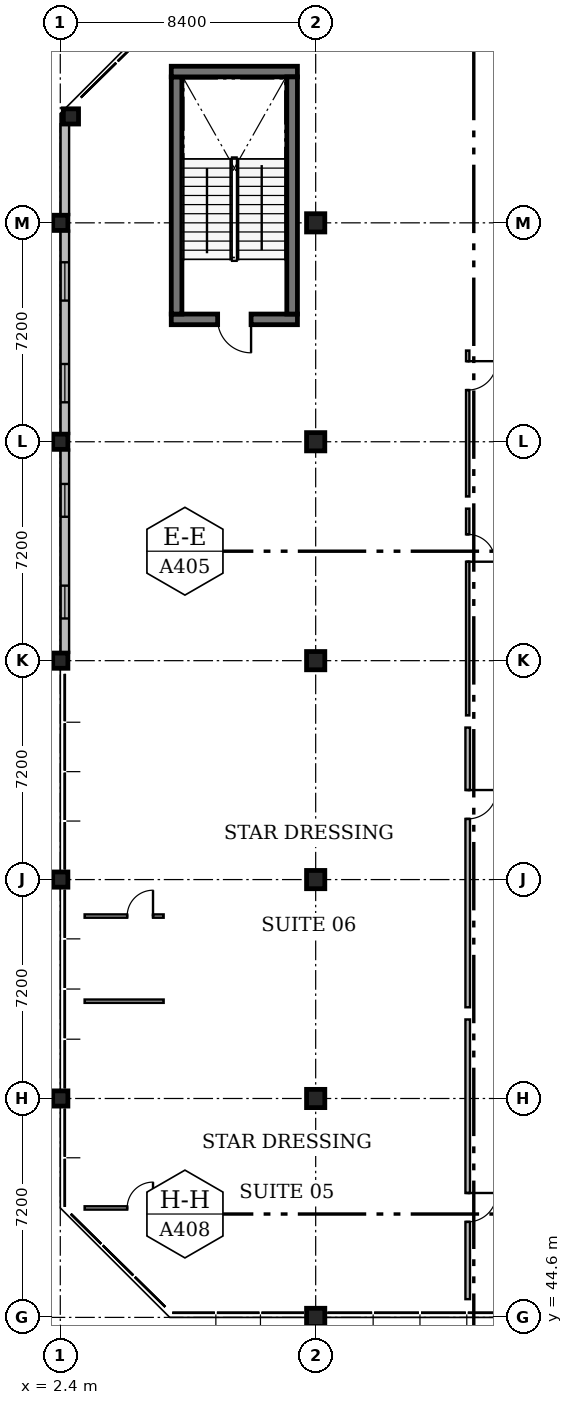
"""IFC4 building model, lengths in metres.
Left out: names, types, materials, properties, quantities, classifications, styles, units other than length and angle.
Written with IfcOpenShell. Run it as: python <this file> out.ifc"""

import sys

from ifc_helpers import new_model, si_unit, direction, frame, frame_2d, origin, origin_2d, place, context, subcontext, project, spatial, rectangle, extrude, element, fill, save


model = new_model("IFC4")
c1 = context("Model", 3, precision=1e-05, world=origin(), true_north=direction((0.0, 1.0)))
c2 = subcontext(c1, "Body", "Model", "MODEL_VIEW")
j1 = project(units=[si_unit("LENGTHUNIT", "METRE"), si_unit("PLANEANGLEUNIT", "RADIAN")], contexts=[c1])
p1 = place(None, origin())
s1 = spatial("IfcSite", under=j1, at=p1, CompositionType="ELEMENT")
p2 = place(p1, origin())
s2 = spatial("IfcBuilding", under=s1, at=p2, CompositionType="ELEMENT")
p3 = place(p2, frame((0.0, 0.0, 4.8)))
s3 = spatial("IfcBuildingStorey", under=s2, at=p3, CompositionType="ELEMENT", Elevation=4.8)
for number, where, z_axis, x_axis in (
    (1, (2.4, 51.8, 0.0), (0.0, 0.0, 1.0), (1.0, 0.0, 0.0)),
    (2, (2.4, 59.0, 0.0), (0.0, 0.0, 1.0), (1.0, 0.0, 0.0)),
    (3, (2.4, 66.2, 0.0), (0.0, 0.0, 1.0), (1.0, 0.0, 0.0)),
    (4, (2.4, 73.4, 0.0), (0.0, 0.0, 1.0), (1.0, 0.0, 0.0)),
    (5, (2.4, 80.6, 0.0), (0.0, 0.0, 1.0), (1.0, 0.0, 0.0)),
):
    element("IfcColumn", number, at=place(p3, frame(where, z_axis=z_axis, x_axis=x_axis)), inside=s3, PredefinedType="COLUMN", context=c2, shape_type="SweptSolid", body=[
        extrude(rectangle(XDim=0.5, YDim=0.5, at=origin_2d()), origin(), (0.0, 0.0, 1.0), 4.2),
    ])
for number, where, z_axis, x_axis in (
    (6, (10.8, 44.6, 0.0), (0.0, 0.0, 1.0), (1.0, 0.0, 0.0)),
    (7, (10.8, 51.8, 0.0), (0.0, 0.0, 1.0), (1.0, 0.0, 0.0)),
    (8, (10.8, 59.0, 0.0), (0.0, 0.0, 1.0), (1.0, 0.0, 0.0)),
    (9, (10.8, 66.2, 0.0), (0.0, 0.0, 1.0), (1.0, 0.0, 0.0)),
    (10, (10.8, 73.4, 0.0), (0.0, 0.0, 1.0), (1.0, 0.0, 0.0)),
    (11, (10.8, 80.6, 0.0), (0.0, 0.0, 1.0), (1.0, 0.0, 0.0)),
):
    element("IfcColumn", number, at=place(p3, frame(where, z_axis=z_axis, x_axis=x_axis)), inside=s3, PredefinedType="COLUMN", context=c2, shape_type="SweptSolid", body=[
        extrude(rectangle(XDim=0.6, YDim=0.6, at=origin_2d()), origin(), (0.0, 0.0, 1.0), 4.2),
    ])
p4 = place(p3, frame((2.75, 84.1, 0.0), z_axis=(0.0, 0.0, 1.0), x_axis=(1.0, 0.0, 0.0)))
e12 = element("IfcColumn", 12, at=p4, inside=s3, PredefinedType="COLUMN", context=c2, shape_type="SweptSolid", body=[
    extrude(rectangle(XDim=0.5, YDim=0.5, at=origin_2d()), origin(), (0.0, 0.0, 1.0), 4.2),
])
p5 = place(p3, frame((10.2, 77.425, 0.0), z_axis=(0.0, 0.0, 1.0), x_axis=(-1.0, 0.0, 0.0)))
e13 = element("IfcWall", 13, at=p5, inside=s3, PredefinedType="SOLIDWALL", context=c2, shape_type="SweptSolid", body=[
    extrude(rectangle(XDim=4.15, YDim=0.35, at=frame_2d((2.075, 0.0))), origin(), (0.0, 0.0, 1.0), 4.2),
])
p6 = place(p5, frame((1.525, 0.0, 0.0)))
e14 = element("IfcOpeningElement", 14, at=p6, cuts=e13, PredefinedType="OPENING", context=c2, shape_type="SweptSolid", body=[
    extrude(rectangle(XDim=1.1, YDim=2.15, at=frame_2d((0.55, 1.075))), frame((0.0, 0.195, 0.0), z_axis=(0.0, -1.0, 0.0), x_axis=(1.0, 0.0, 0.0)), (0.0, 0.0, 1.0), 0.39),
])
p7 = place(p3, frame((6.225, 77.6, 0.0), z_axis=(0.0, 0.0, 1.0), x_axis=(0.0, 1.0, 0.0)))
e15 = element("IfcWall", 15, at=p7, inside=s3, PredefinedType="SOLIDWALL", context=c2, shape_type="SweptSolid", body=[
    extrude(rectangle(XDim=7.8, YDim=0.35, at=frame_2d((3.9, 0.0))), origin(), (0.0, 0.0, 1.0), 4.2),
])
p8 = place(p3, frame((6.05, 85.575, 0.0), z_axis=(0.0, 0.0, 1.0), x_axis=(1.0, 0.0, 0.0)))
e16 = element("IfcWall", 16, at=p8, inside=s3, PredefinedType="SOLIDWALL", context=c2, shape_type="SweptSolid", body=[
    extrude(rectangle(XDim=4.15, YDim=0.35, at=frame_2d((2.075, 0.0))), origin(), (0.0, 0.0, 1.0), 4.2),
])
p9 = place(p3, frame((10.025, 85.4, 0.0), z_axis=(0.0, 0.0, 1.0), x_axis=(0.0, -1.0, 0.0)))
e17 = element("IfcWall", 17, at=p9, inside=s3, PredefinedType="SOLIDWALL", context=c2, shape_type="SweptSolid", body=[
    extrude(rectangle(XDim=7.8, YDim=0.35, at=frame_2d((3.9, 0.0))), origin(), (0.0, 0.0, 1.0), 4.2),
])
p10 = place(p3, frame((2.55, 66.455, 0.0), z_axis=(0.0, 0.0, 1.0), x_axis=(0.0, 1.0, 0.0)))
e18 = element("IfcWall", 18, at=p10, inside=s3, PredefinedType="SOLIDWALL", context=c2, shape_type="SweptSolid", body=[
    extrude(rectangle(XDim=6.69, YDim=0.28, at=frame_2d((3.345, 0.0))), origin(), (0.0, 0.0, 1.0), 3.653),
])
p11 = place(p10, frame((1.133, 0.0, 0.95)))
e19 = element("IfcOpeningElement", 19, at=p11, cuts=e18, PredefinedType="OPENING", context=c2, shape_type="SweptSolid", body=[
    extrude(rectangle(XDim=1.08, YDim=1.6, at=frame_2d((0.54, 0.8))), frame((0.0, 0.16, 0.0), z_axis=(0.0, -1.0, 0.0), x_axis=(1.0, 0.0, 0.0)), (0.0, 0.0, 1.0), 0.32),
])
p12 = place(p10, frame((4.478, 0.0, 0.95)))
e20 = element("IfcOpeningElement", 20, at=p12, cuts=e18, PredefinedType="OPENING", context=c2, shape_type="SweptSolid", body=[
    extrude(rectangle(XDim=1.08, YDim=1.6, at=frame_2d((0.54, 0.8))), frame((0.0, 0.16, 0.0), z_axis=(0.0, -1.0, 0.0), x_axis=(1.0, 0.0, 0.0)), (0.0, 0.0, 1.0), 0.32),
])
p13 = place(p3, frame((2.55, 73.655, 0.0), z_axis=(0.0, 0.0, 1.0), x_axis=(0.0, 1.0, 0.0)))
e21 = element("IfcWall", 21, at=p13, inside=s3, PredefinedType="SOLIDWALL", context=c2, shape_type="SweptSolid", body=[
    extrude(rectangle(XDim=6.69, YDim=0.28, at=frame_2d((3.345, 0.0))), origin(), (0.0, 0.0, 1.0), 3.653),
])
p14 = place(p13, frame((1.042, 0.0, 0.95)))
e22 = element("IfcOpeningElement", 22, at=p14, cuts=e21, PredefinedType="OPENING", context=c2, shape_type="SweptSolid", body=[
    extrude(rectangle(XDim=1.26, YDim=1.65, at=frame_2d((0.63, 0.825))), frame((0.0, 0.16, 0.0), z_axis=(0.0, -1.0, 0.0), x_axis=(1.0, 0.0, 0.0)), (0.0, 0.0, 1.0), 0.32),
])
p15 = place(p13, frame((4.387, 0.0, 0.95)))
e23 = element("IfcOpeningElement", 23, at=p15, cuts=e21, PredefinedType="OPENING", context=c2, shape_type="SweptSolid", body=[
    extrude(rectangle(XDim=1.26, YDim=1.65, at=frame_2d((0.63, 0.825))), frame((0.0, 0.16, 0.0), z_axis=(0.0, -1.0, 0.0), x_axis=(1.0, 0.0, 0.0)), (0.0, 0.0, 1.0), 0.32),
])
p16 = place(p3, frame((2.55, 80.855, 0.0), z_axis=(0.0, 0.0, 1.0), x_axis=(0.0, 1.0, 0.0)))
e24 = element("IfcWall", 24, at=p16, inside=s3, PredefinedType="SOLIDWALL", context=c2, shape_type="SweptSolid", body=[
    extrude(rectangle(XDim=2.99, YDim=0.28, at=frame_2d((1.495, 0.0))), origin(), (0.0, 0.0, 1.0), 3.94),
])
p17 = place(p3, frame((3.2, 48.2, 0.0), z_axis=(0.0, 0.0, 1.0), x_axis=(1.0, 0.0, 0.0)))
e25 = element("IfcWall", 25, at=p17, inside=s3, PredefinedType="PARTITIONING", context=c2, shape_type="SweptSolid", body=[
    extrude(rectangle(XDim=2.6, YDim=0.11, at=frame_2d((1.3, 0.0))), origin(), (0.0, 0.0, 1.0), 3.94),
])
p18 = place(p17, frame((1.4, 0.0, 0.0)))
e26 = element("IfcOpeningElement", 26, at=p18, cuts=e25, PredefinedType="OPENING", context=c2, shape_type="SweptSolid", body=[
    extrude(rectangle(XDim=0.85, YDim=2.1, at=frame_2d((0.425, 1.05))), frame((0.0, 0.075, 0.0), z_axis=(0.0, -1.0, 0.0), x_axis=(1.0, 0.0, 0.0)), (0.0, 0.0, 1.0), 0.15),
])
p19 = place(p3, frame((15.8, 54.4, 0.0), z_axis=(0.0, 0.0, 1.0), x_axis=(0.0, -1.0, 0.0)))
e27 = element("IfcWall", 27, at=p19, inside=s3, PredefinedType="PARTITIONING", context=c2, shape_type="SweptSolid", body=[
    extrude(rectangle(XDim=9.2, YDim=0.15, at=frame_2d((4.6, 0.0))), origin(), (0.0, 0.0, 1.0), 3.94),
])
p20 = place(p19, frame((5.708, 0.0, 0.0)))
e28 = element("IfcOpeningElement", 28, at=p20, cuts=e27, PredefinedType="OPENING", context=c2, shape_type="SweptSolid", body=[
    extrude(rectangle(XDim=0.95, YDim=2.2, at=frame_2d((0.475, 1.1))), frame((0.0, 0.095, 0.0), z_axis=(0.0, -1.0, 0.0), x_axis=(1.0, 0.0, 0.0)), (0.0, 0.0, 1.0), 0.19),
])
p21 = place(p3, frame((3.2, 57.8, 0.0), z_axis=(0.0, 0.0, 1.0), x_axis=(1.0, 0.0, 0.0)))
e29 = element("IfcWall", 29, at=p21, inside=s3, PredefinedType="PARTITIONING", context=c2, shape_type="SweptSolid", body=[
    extrude(rectangle(XDim=2.6, YDim=0.11, at=frame_2d((1.3, 0.0))), origin(), (0.0, 0.0, 1.0), 3.94),
])
p22 = place(p21, frame((1.4, 0.0, 0.0)))
e30 = element("IfcOpeningElement", 30, at=p22, cuts=e29, PredefinedType="OPENING", context=c2, shape_type="SweptSolid", body=[
    extrude(rectangle(XDim=0.85, YDim=2.1, at=frame_2d((0.425, 1.05))), frame((0.0, 0.075, 0.0), z_axis=(0.0, -1.0, 0.0), x_axis=(1.0, 0.0, 0.0)), (0.0, 0.0, 1.0), 0.15),
])
p23 = place(p3, frame((5.8, 55.0, 0.0), z_axis=(0.0, 0.0, 1.0), x_axis=(-1.0, 0.0, 0.0)))
e31 = element("IfcWall", 31, at=p23, inside=s3, PredefinedType="PARTITIONING", context=c2, shape_type="SweptSolid", body=[
    extrude(rectangle(XDim=2.6, YDim=0.11, at=frame_2d((1.3, 0.0))), origin(), (0.0, 0.0, 1.0), 3.94),
])
p24 = place(p3, frame((15.8, 64.0, 0.0), z_axis=(0.0, 0.0, 1.0), x_axis=(0.0, -1.0, 0.0)))
e32 = element("IfcWall", 32, at=p24, inside=s3, PredefinedType="PARTITIONING", context=c2, shape_type="SweptSolid", body=[
    extrude(rectangle(XDim=9.2, YDim=0.15, at=frame_2d((4.6, 0.0))), origin(), (0.0, 0.0, 1.0), 3.94),
])
p25 = place(p24, frame((2.055, 0.0, 0.0)))
e33 = element("IfcOpeningElement", 33, at=p25, cuts=e32, PredefinedType="OPENING", context=c2, shape_type="SweptSolid", body=[
    extrude(rectangle(XDim=0.95, YDim=2.2, at=frame_2d((0.475, 1.1))), frame((0.0, 0.095, 0.0), z_axis=(0.0, -1.0, 0.0), x_axis=(1.0, 0.0, 0.0)), (0.0, 0.0, 1.0), 0.19),
])
p26 = place(p3, frame((15.8, 71.2, 0.0), z_axis=(0.0, 0.0, 1.0), x_axis=(0.0, -1.0, 0.0)))
e34 = element("IfcWall", 34, at=p26, inside=s3, PredefinedType="PARTITIONING", context=c2, shape_type="SweptSolid", body=[
    extrude(rectangle(XDim=6.8, YDim=0.11, at=frame_2d((3.4, 0.0))), origin(), (0.0, 0.0, 1.0), 3.94),
])
p27 = place(p26, frame((0.845, 0.0, 0.0)))
e35 = element("IfcOpeningElement", 35, at=p27, cuts=e34, PredefinedType="OPENING", context=c2, shape_type="SweptSolid", body=[
    extrude(rectangle(XDim=0.9, YDim=2.15, at=frame_2d((0.45, 1.075))), frame((0.0, 0.075, 0.0), z_axis=(0.0, -1.0, 0.0), x_axis=(1.0, 0.0, 0.0)), (0.0, 0.0, 1.0), 0.15),
])
p28 = place(p3, frame((15.8, 76.4, 0.0), z_axis=(0.0, 0.0, 1.0), x_axis=(0.0, -1.0, 0.0)))
e36 = element("IfcWall", 36, at=p28, inside=s3, PredefinedType="PARTITIONING", context=c2, shape_type="SweptSolid", body=[
    extrude(rectangle(XDim=4.8, YDim=0.11, at=frame_2d((2.4, 0.0))), origin(), (0.0, 0.0, 1.0), 3.94),
])
p29 = place(p28, frame((0.35, 0.0, 0.0)))
e37 = element("IfcOpeningElement", 37, at=p29, cuts=e36, PredefinedType="OPENING", context=c2, shape_type="SweptSolid", body=[
    extrude(rectangle(XDim=0.95, YDim=2.1, at=frame_2d((0.475, 1.05))), frame((0.0, 0.075, 0.0), z_axis=(0.0, -1.0, 0.0), x_axis=(1.0, 0.0, 0.0)), (0.0, 0.0, 1.0), 0.15),
])
p30 = place(p6, origin())
e38 = element("IfcDoor", 38, at=p30, inside=s3, OperationType="SINGLE_SWING_LEFT", PredefinedType="DOOR", context=c2, shape_type="SweptSolid", body=[
    extrude(rectangle(XDim=1.1, YDim=2.15, at=frame_2d((0.55, 1.075))), frame((0.0, 0.025, 0.0), z_axis=(0.0, -1.0, 0.0), x_axis=(1.0, 0.0, 0.0)), (0.0, 0.0, 1.0), 0.05),
])
fill(e14, e38)
p31 = place(p11, origin())
e39 = element("IfcWindow", 39, at=p31, inside=s3, PartitioningType="SINGLE_PANEL", PredefinedType="WINDOW", context=c2, shape_type="SweptSolid", body=[
    extrude(rectangle(XDim=1.08, YDim=1.6, at=frame_2d((0.54, 0.8))), frame((0.0, 0.03, 0.0), z_axis=(0.0, -1.0, 0.0), x_axis=(1.0, 0.0, 0.0)), (0.0, 0.0, 1.0), 0.06),
])
fill(e19, e39)
p32 = place(p12, origin())
e40 = element("IfcWindow", 40, at=p32, inside=s3, PartitioningType="SINGLE_PANEL", PredefinedType="WINDOW", context=c2, shape_type="SweptSolid", body=[
    extrude(rectangle(XDim=1.08, YDim=1.6, at=frame_2d((0.54, 0.8))), frame((0.0, 0.03, 0.0), z_axis=(0.0, -1.0, 0.0), x_axis=(1.0, 0.0, 0.0)), (0.0, 0.0, 1.0), 0.06),
])
fill(e20, e40)
p33 = place(p14, origin())
e41 = element("IfcWindow", 41, at=p33, inside=s3, PartitioningType="SINGLE_PANEL", PredefinedType="WINDOW", context=c2, shape_type="SweptSolid", body=[
    extrude(rectangle(XDim=1.26, YDim=1.65, at=frame_2d((0.63, 0.825))), frame((0.0, 0.03, 0.0), z_axis=(0.0, -1.0, 0.0), x_axis=(1.0, 0.0, 0.0)), (0.0, 0.0, 1.0), 0.06),
])
fill(e22, e41)
p34 = place(p15, origin())
e42 = element("IfcWindow", 42, at=p34, inside=s3, PartitioningType="SINGLE_PANEL", PredefinedType="WINDOW", context=c2, shape_type="SweptSolid", body=[
    extrude(rectangle(XDim=1.26, YDim=1.65, at=frame_2d((0.63, 0.825))), frame((0.0, 0.03, 0.0), z_axis=(0.0, -1.0, 0.0), x_axis=(1.0, 0.0, 0.0)), (0.0, 0.0, 1.0), 0.06),
])
fill(e23, e42)
p35 = place(p18, origin())
e43 = element("IfcDoor", 43, at=p35, inside=s3, OperationType="SINGLE_SWING_RIGHT", PredefinedType="DOOR", context=c2, shape_type="SweptSolid", body=[
    extrude(rectangle(XDim=0.85, YDim=2.1, at=frame_2d((0.425, 1.05))), frame((0.0, 0.025, 0.0), z_axis=(0.0, -1.0, 0.0), x_axis=(1.0, 0.0, 0.0)), (0.0, 0.0, 1.0), 0.05),
])
fill(e26, e43)
p36 = place(p20, origin())
e44 = element("IfcDoor", 44, at=p36, inside=s3, OperationType="SINGLE_SWING_LEFT", PredefinedType="DOOR", context=c2, shape_type="SweptSolid", body=[
    extrude(rectangle(XDim=0.95, YDim=2.2, at=frame_2d((0.475, 1.1))), frame((0.0, 0.025, 0.0), z_axis=(0.0, -1.0, 0.0), x_axis=(1.0, 0.0, 0.0)), (0.0, 0.0, 1.0), 0.05),
])
fill(e28, e44)
p37 = place(p22, origin())
e45 = element("IfcDoor", 45, at=p37, inside=s3, OperationType="SINGLE_SWING_RIGHT", PredefinedType="DOOR", context=c2, shape_type="SweptSolid", body=[
    extrude(rectangle(XDim=0.85, YDim=2.1, at=frame_2d((0.425, 1.05))), frame((0.0, 0.025, 0.0), z_axis=(0.0, -1.0, 0.0), x_axis=(1.0, 0.0, 0.0)), (0.0, 0.0, 1.0), 0.05),
])
fill(e30, e45)
p38 = place(p25, origin())
e46 = element("IfcDoor", 46, at=p38, inside=s3, OperationType="SINGLE_SWING_LEFT", PredefinedType="DOOR", context=c2, shape_type="SweptSolid", body=[
    extrude(rectangle(XDim=0.95, YDim=2.2, at=frame_2d((0.475, 1.1))), frame((0.0, 0.025, 0.0), z_axis=(0.0, -1.0, 0.0), x_axis=(1.0, 0.0, 0.0)), (0.0, 0.0, 1.0), 0.05),
])
fill(e33, e46)
p39 = place(p27, origin())
e47 = element("IfcDoor", 47, at=p39, inside=s3, OperationType="SINGLE_SWING_RIGHT", PredefinedType="DOOR", context=c2, shape_type="SweptSolid", body=[
    extrude(rectangle(XDim=0.9, YDim=2.15, at=frame_2d((0.45, 1.075))), frame((0.0, 0.025, 0.0), z_axis=(0.0, -1.0, 0.0), x_axis=(1.0, 0.0, 0.0)), (0.0, 0.0, 1.0), 0.05),
])
fill(e35, e47)
p40 = place(p29, origin())
e48 = element("IfcDoor", 48, at=p40, inside=s3, OperationType="SINGLE_SWING_LEFT", PredefinedType="DOOR", context=c2, shape_type="SweptSolid", body=[
    extrude(rectangle(XDim=0.95, YDim=2.1, at=frame_2d((0.475, 1.05))), frame((0.0, 0.025, 0.0), z_axis=(0.0, -1.0, 0.0), x_axis=(1.0, 0.0, 0.0)), (0.0, 0.0, 1.0), 0.05),
])
fill(e37, e48)
save(model, sys.argv[1])
